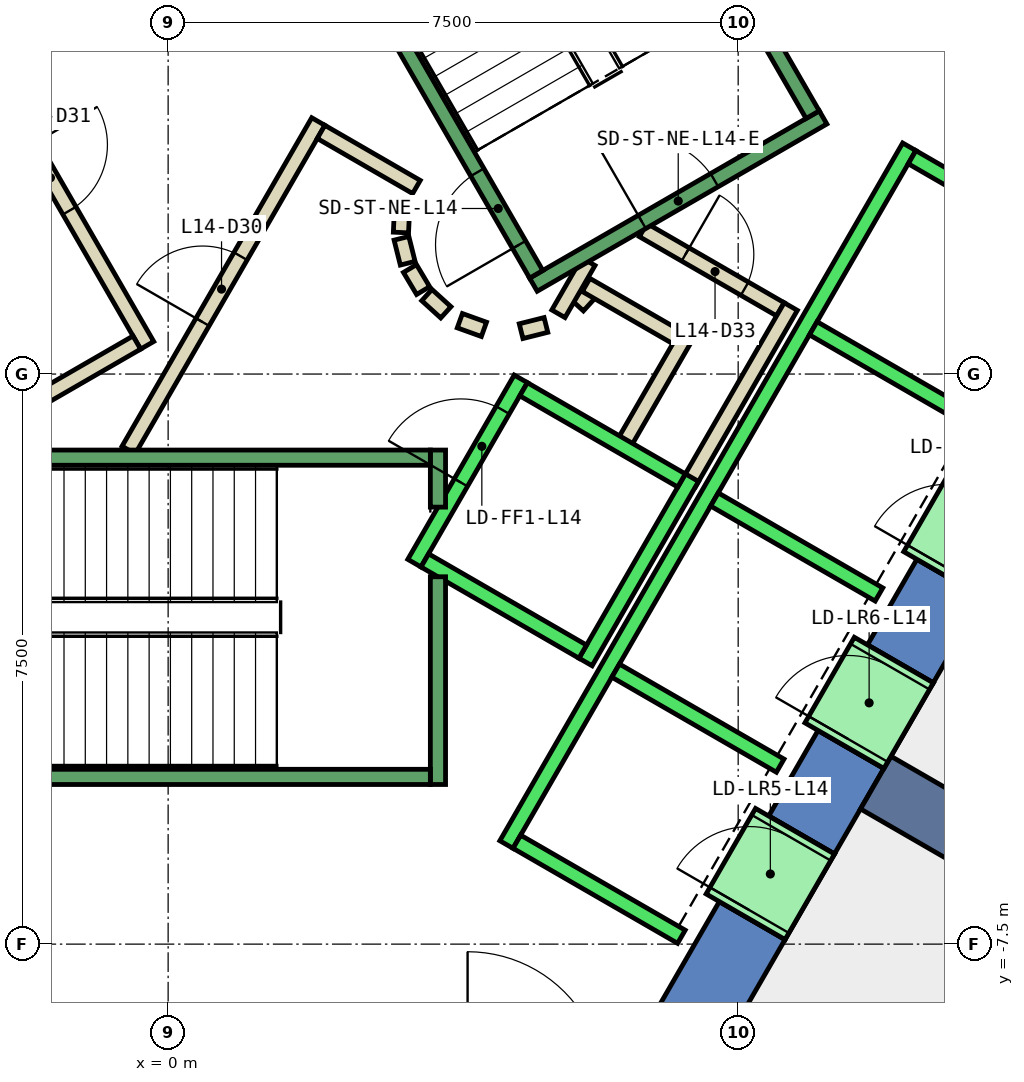
"""IFC4 building model, lengths in metres.
Left out: names, types, materials, properties, quantities, classifications, styles, units other than length and angle.
Written with IfcOpenShell. Run it as: python <this file> out.ifc"""

import sys

from ifc_helpers import new_model, si_unit, direction, frame, frame_2d, origin, place, context, subcontext, project, spatial, polyline, rectangle, outline, extrude, element, fill, save


model = new_model("IFC4")
c1 = context("Model", 3, precision=1e-05, world=origin(), true_north=direction((0.0, 1.0)))
c2 = subcontext(c1, "Body", "Model", "MODEL_VIEW")
j1 = project(units=[si_unit("LENGTHUNIT", "METRE"), si_unit("PLANEANGLEUNIT", "RADIAN")], contexts=[c1])
p1 = place(None, origin())
s1 = spatial("IfcSite", under=j1, at=p1, CompositionType="ELEMENT")
p2 = place(p1, origin())
s2 = spatial("IfcBuilding", under=s1, at=p2, CompositionType="ELEMENT")
p3 = place(p2, frame((0.0, 0.0, 68.6)))
s3 = spatial("IfcBuildingStorey", under=s2, at=p3, CompositionType="ELEMENT", Elevation=68.6)
p4 = place(p3, frame((0.0, 0.0, -0.4)))
e1 = element("IfcWall", 1, at=p4, inside=s3, PredefinedType="SHEAR", context=c2, shape_type="SweptSolid", body=[
    extrude(outline(polyline([(8.517, 11.748), (7.651, 11.248), (12.702, 2.5), (13.856, 2.5), (8.517, 11.748)])), origin(), (0.0, 0.0, 1.0), 4.2),
])
p5 = place(p3, frame((0.0, 0.0, -0.4)))
e2 = element("IfcWall", 2, at=p5, inside=s3, PredefinedType="SHEAR", context=c2, shape_type="SweptSolid", body=[
    extrude(outline(polyline([(8.117, -7.44), (7.252, -6.94), (6.351, -8.5), (6.928, -9.5), (8.117, -7.44)])), origin(), (0.0, 0.0, 1.0), 4.2),
])
p6 = place(p3, frame((0.0, 0.0, -0.4)))
e3 = element("IfcWall", 3, at=p6, inside=s3, PredefinedType="SHEAR", context=c2, shape_type="SweptSolid", body=[
    extrude(outline(polyline([(9.417, -5.189), (8.551, -4.689), (7.902, -5.814), (8.767, -6.314), (9.417, -5.189)])), origin(), (0.0, 0.0, 1.0), 4.2),
])
p7 = place(p3, frame((0.0, 0.0, -0.4)))
e4 = element("IfcWall", 4, at=p7, inside=s3, PredefinedType="SHEAR", context=c2, shape_type="SweptSolid", body=[
    extrude(outline(polyline([(10.717, -2.937), (9.851, -2.437), (9.201, -3.563), (10.067, -4.063), (10.717, -2.937)])), origin(), (0.0, 0.0, 1.0), 4.2),
])
p8 = place(p3, frame((0.0, 0.0, 3.6)))
e5 = element("IfcWall", 5, at=p8, inside=s3, PredefinedType="SHEAR", context=c2, shape_type="SweptSolid", body=[
    extrude(outline(polyline([(8.767, -6.314), (7.902, -5.814), (7.252, -6.94), (8.117, -7.44), (8.767, -6.314)])), origin(), (0.0, 0.0, 1.0), 0.2),
])
p9 = place(p3, frame((0.0, 0.0, 3.6)))
e6 = element("IfcWall", 6, at=p9, inside=s3, PredefinedType="SHEAR", context=c2, shape_type="SweptSolid", body=[
    extrude(outline(polyline([(10.067, -4.063), (9.201, -3.563), (8.551, -4.689), (9.417, -5.189), (10.067, -4.063)])), origin(), (0.0, 0.0, 1.0), 0.2),
])
p10 = place(p3, frame((0.0, 0.0, 3.6)))
e7 = element("IfcWall", 7, at=p10, inside=s3, PredefinedType="SHEAR", context=c2, shape_type="SweptSolid", body=[
    extrude(outline(polyline([(11.367, -1.811), (10.501, -1.311), (9.851, -2.437), (10.717, -2.937), (11.367, -1.811)])), origin(), (0.0, 0.0, 1.0), 0.2),
])
p11 = place(p3, frame((9.31, -5.375, -0.4), z_axis=(0.0, 0.0, 1.0), x_axis=(0.866017533419, -0.500013631625, 0.0)))
e8 = element("IfcWall", 8, at=p11, inside=s3, PredefinedType="SHEAR", context=c2, shape_type="SweptSolid", body=[
    extrude(rectangle(XDim=9.0, YDim=0.8, at=frame_2d((4.5, 0.0))), origin(), (0.0, 0.0, 1.0), 4.2),
])
p12 = place(p3, frame((5.39, 0.898, 0.0), z_axis=(0.0, 0.0, 1.0), x_axis=(0.673828488714, 0.738887791073, 0.0)))
e9 = element("IfcWall", 9, at=p12, inside=s3, PredefinedType="PARTITIONING", context=c2, shape_type="SweptSolid", body=[
    extrude(rectangle(XDim=0.263, YDim=0.2, at=frame_2d((0.131, 0.0))), origin(), (0.0, 0.0, 1.0), 3.8),
])
p13 = place(p3, frame((5.499, 1.172, 0.0), z_axis=(0.0, 0.0, 1.0), x_axis=(0.866333505267, -0.499465972466, 0.0)))
e10 = element("IfcWall", 10, at=p13, inside=s3, PredefinedType="PARTITIONING", context=c2, shape_type="SweptSolid", body=[
    extrude(rectangle(XDim=1.374, YDim=0.2, at=frame_2d((0.687, 0.0))), origin(), (0.0, 0.0, 1.0), 3.8),
])
p14 = place(p3, frame((6.826, 0.522, 0.0), z_axis=(0.0, 0.0, 1.0), x_axis=(-0.500016722714, -0.866015748706, 0.0)))
e11 = element("IfcWall", 11, at=p14, inside=s3, PredefinedType="PARTITIONING", context=c2, shape_type="SweptSolid", body=[
    extrude(rectangle(XDim=1.7, YDim=0.2, at=frame_2d((0.85, 0.0))), origin(), (0.0, 0.0, 1.0), 3.8),
])
p15 = place(p3, frame((6.25, 1.894, 0.0), z_axis=(0.0, 0.0, 1.0), x_axis=(0.866043184279, -0.499969202016, 0.0)))
e12 = element("IfcWall", 12, at=p15, inside=s3, PredefinedType="PARTITIONING", context=c2, shape_type="SweptSolid", body=[
    extrude(rectangle(XDim=2.084, YDim=0.2, at=frame_2d((1.042, 0.0))), origin(), (0.0, 0.0, 1.0), 3.8),
])
p16 = place(p15, frame((0.642, 0.0, 0.0)))
e13 = element("IfcOpeningElement", 13, at=p16, cuts=e12, PredefinedType="OPENING", context=c2, shape_type="SweptSolid", body=[
    extrude(rectangle(XDim=0.9, YDim=2.1, at=frame_2d((0.45, 1.05))), frame((0.0, 0.11, 0.0), z_axis=(0.0, -1.0, 0.0), x_axis=(1.0, 0.0, 0.0)), (0.0, 0.0, 1.0), 0.22),
])
p17 = place(p3, frame((8.192, 0.888, 0.0), z_axis=(0.0, 0.0, 1.0), x_axis=(-0.499940625693, -0.866059680843, 0.0)))
e14 = element("IfcWall", 14, at=p17, inside=s3, PredefinedType="PARTITIONING", context=c2, shape_type="SweptSolid", body=[
    extrude(rectangle(XDim=2.68, YDim=0.2, at=frame_2d((1.34, 0.0))), origin(), (0.0, 0.0, 1.0), 3.8),
])
p18 = place(p3, frame((5.135, 0.793, 0.0), z_axis=(0.0, 0.0, 1.0), x_axis=(0.499526442893, 0.866298639529, 0.0)))
e15 = element("IfcWall", 15, at=p18, inside=s3, PredefinedType="PARTITIONING", context=c2, shape_type="SweptSolid", body=[
    extrude(rectangle(XDim=0.791, YDim=0.2, at=frame_2d((0.396, 0.0))), origin(), (0.0, 0.0, 1.0), 3.8),
])
p19 = place(p3, frame((-0.52, -1.0, 0.0), z_axis=(0.0, 0.0, 1.0), x_axis=(0.50011622646, 0.865958290007, 0.0)))
e16 = element("IfcWall", 16, at=p19, inside=s3, PredefinedType="PARTITIONING", context=c2, shape_type="SweptSolid", body=[
    extrude(rectangle(XDim=4.991, YDim=0.2, at=frame_2d((2.496, 0.0))), origin(), (0.0, 0.0, 1.0), 3.8),
])
p20 = place(p19, frame((1.945, 0.0, 0.0)))
e17 = element("IfcOpeningElement", 17, at=p20, cuts=e16, PredefinedType="OPENING", context=c2, shape_type="SweptSolid", body=[
    extrude(rectangle(XDim=1.0, YDim=2.1, at=frame_2d((0.5, 1.05))), frame((0.0, 0.11, 0.0), z_axis=(0.0, -1.0, 0.0), x_axis=(1.0, 0.0, 0.0)), (0.0, 0.0, 1.0), 0.22),
])
p21 = place(p3, frame((2.012, 3.186, 0.0), z_axis=(0.0, 0.0, 1.0), x_axis=(0.865891012941, -0.500232699559, 0.0)))
e18 = element("IfcWall", 18, at=p21, inside=s3, PredefinedType="PARTITIONING", context=c2, shape_type="SweptSolid", body=[
    extrude(rectangle(XDim=1.449, YDim=0.2, at=frame_2d((0.725, 0.0))), origin(), (0.0, 0.0, 1.0), 3.8),
])
p22 = place(p3, frame((3.079, 2.199, 0.0), z_axis=(0.0, 0.0, 1.0), x_axis=(-0.047771483479, -0.998858290933, 0.0)))
e19 = element("IfcWall", 19, at=p22, inside=s3, PredefinedType="PARTITIONING", context=c2, shape_type="SweptSolid", body=[
    extrude(rectangle(XDim=0.337, YDim=0.2, at=frame_2d((0.169, 0.0))), origin(), (0.0, 0.0, 1.0), 3.8),
])
p23 = place(p3, frame((3.07, 1.786, 0.0), z_axis=(0.0, 0.0, 1.0), x_axis=(0.242705583207, -0.970099994784, 0.0)))
e20 = element("IfcWall", 20, at=p23, inside=s3, PredefinedType="PARTITIONING", context=c2, shape_type="SweptSolid", body=[
    extrude(rectangle(XDim=0.338, YDim=0.2, at=frame_2d((0.169, 0.0))), origin(), (0.0, 0.0, 1.0), 3.8),
])
for number, where, z_axis, x_axis in (
    (21, (3.182, 1.388, 0.0), (0.0, 0.0, 1.0), (0.512, -0.859, 0.0)),
    (22, (3.404, 1.039, 0.0), (0.0, 0.0, 1.0), (0.74, -0.672, 0.0)),
):
    element("IfcWall", number, at=place(p3, frame(where, z_axis=z_axis, x_axis=x_axis)), inside=s3, PredefinedType="PARTITIONING", context=c2, shape_type="SweptSolid", body=[
        extrude(rectangle(XDim=0.338, YDim=0.2, at=frame_2d((0.169, 0.0))), origin(), (0.0, 0.0, 1.0), 3.8),
    ])
p24 = place(p3, frame((3.838, 0.702, 0.0), z_axis=(0.0, 0.0, 1.0), x_axis=(0.941035081519, -0.338308993895, 0.0)))
e23 = element("IfcWall", 23, at=p24, inside=s3, PredefinedType="PARTITIONING", context=c2, shape_type="SweptSolid", body=[
    extrude(rectangle(XDim=0.337, YDim=0.2, at=frame_2d((0.168, 0.0))), origin(), (0.0, 0.0, 1.0), 3.8),
])
p25 = place(p3, frame((4.644, 0.564, 0.0), z_axis=(0.0, 0.0, 1.0), x_axis=(0.969929076366, 0.243387729394, 0.0)))
e24 = element("IfcWall", 24, at=p25, inside=s3, PredefinedType="PARTITIONING", context=c2, shape_type="SweptSolid", body=[
    extrude(rectangle(XDim=0.337, YDim=0.2, at=frame_2d((0.168, 0.0))), origin(), (0.0, 0.0, 1.0), 3.8),
])
p26 = place(p3, frame((-2.771, 4.7, 0.0), z_axis=(0.0, 0.0, 1.0), x_axis=(0.499969479948, -0.866043023828, 0.0)))
e25 = element("IfcWall", 25, at=p26, inside=s3, PredefinedType="PARTITIONING", context=c2, shape_type="SweptSolid", body=[
    extrude(rectangle(XDim=4.99, YDim=0.2, at=frame_2d((2.495, 0.0))), origin(), (0.0, 0.0, 1.0), 3.8),
])
p27 = place(p26, frame((1.945, 0.0, 0.0)))
e26 = element("IfcOpeningElement", 26, at=p27, cuts=e25, PredefinedType="OPENING", context=c2, shape_type="SweptSolid", body=[
    extrude(rectangle(XDim=1.0, YDim=2.1, at=frame_2d((0.5, 1.05))), frame((0.0, 0.11, 0.0), z_axis=(0.0, -1.0, 0.0), x_axis=(1.0, 0.0, 0.0)), (0.0, 0.0, 1.0), 0.22),
])
p28 = place(p3, frame((-0.412, 0.414, 0.0), z_axis=(0.0, 0.0, 1.0), x_axis=(-0.866017369001, -0.500013916395, 0.0)))
e27 = element("IfcWall", 27, at=p28, inside=s3, PredefinedType="PARTITIONING", context=c2, shape_type="SweptSolid", body=[
    extrude(rectangle(XDim=1.45, YDim=0.2, at=frame_2d((0.725, 0.0))), origin(), (0.0, 0.0, 1.0), 3.8),
])
p29 = place(p3, frame((12.401, -7.622, 0.0), z_axis=(0.0, 0.0, 1.0), x_axis=(-0.500029185841, -0.866008552675, 0.0)))
e28 = element("IfcWall", 28, at=p29, inside=s3, PredefinedType="PARTITIONING", context=c2, shape_type="SweptSolid", body=[
    extrude(rectangle(XDim=9.301, YDim=0.2, at=frame_2d((4.651, 0.0))), origin(), (0.0, 0.0, 1.0), 3.8),
])
p30 = place(p3, frame((3.24, -2.488, 0.0), z_axis=(0.0, 0.0, 1.0), x_axis=(0.49994636267, 0.866056369097, 0.0)))
e29 = element("IfcWall", 29, at=p30, inside=s3, PredefinedType="STANDARD", context=c2, shape_type="SweptSolid", body=[
    extrude(rectangle(XDim=2.8, YDim=0.2, at=frame_2d((1.4, 0.0))), origin(), (0.0, 0.0, 1.0), 3.8),
])
p31 = place(p30, frame((1.225, 0.0, 0.0)))
e30 = element("IfcOpeningElement", 30, at=p31, cuts=e29, PredefinedType="OPENING", context=c2, shape_type="SweptSolid", body=[
    extrude(rectangle(XDim=1.1, YDim=2.1, at=frame_2d((0.55, 1.05))), frame((0.0, 0.11, 0.0), z_axis=(0.0, -1.0, 0.0), x_axis=(1.0, 0.0, 0.0)), (0.0, 0.0, 1.0), 0.22),
])
p32 = place(p3, frame((5.492, -3.788, 0.0), z_axis=(0.0, 0.0, 1.0), x_axis=(0.500011755427, 0.866018616679, 0.0)))
e31 = element("IfcWall", 31, at=p32, inside=s3, PredefinedType="STANDARD", context=c2, shape_type="SweptSolid", body=[
    extrude(rectangle(XDim=2.8, YDim=0.2, at=frame_2d((1.4, 0.0))), origin(), (0.0, 0.0, 1.0), 3.8),
])
p33 = place(p3, frame((3.377, -2.452, 0.0), z_axis=(0.0, 0.0, 1.0), x_axis=(0.865955154139, -0.50012165622, 0.0)))
e32 = element("IfcWall", 32, at=p33, inside=s3, PredefinedType="STANDARD", context=c2, shape_type="SweptSolid", body=[
    extrude(rectangle(XDim=2.4, YDim=0.2, at=frame_2d((1.2, 0.0))), origin(), (0.0, 0.0, 1.0), 3.8),
])
p34 = place(p3, frame((4.677, -0.2, 0.0), z_axis=(0.0, 0.0, 1.0), x_axis=(0.865973769406, -0.500089422704, 0.0)))
e33 = element("IfcWall", 33, at=p34, inside=s3, PredefinedType="STANDARD", context=c2, shape_type="SweptSolid", body=[
    extrude(rectangle(XDim=2.399, YDim=0.2, at=frame_2d((1.2, 0.0))), origin(), (0.0, 0.0, 1.0), 3.8),
])
p35 = place(p3, frame((4.451, -6.19, 0.0), z_axis=(0.0, 0.0, 1.0), x_axis=(0.50000090737, 0.866024879913, 0.0)))
e34 = element("IfcWall", 34, at=p35, inside=s3, PredefinedType="STANDARD", context=c2, shape_type="SweptSolid", body=[
    extrude(rectangle(XDim=10.6, YDim=0.2, at=frame_2d((5.3, 0.0))), origin(), (0.0, 0.0, 1.0), 3.8),
])
for number, where, z_axis, x_axis in (
    (35, (4.588, -6.153, 0.0), (0.0, 0.0, 1.0), (0.866, -0.5, 0.0)),
    (36, (5.888, -3.902, 0.0), (0.0, 0.0, 1.0), (0.866, -0.5, 0.0)),
    (37, (7.188, -1.65, 0.0), (0.0, 0.0, 1.0), (0.866, -0.5, 0.0)),
    (38, (8.488, 0.602, 0.0), (0.0, 0.0, 1.0), (0.866, -0.5, 0.0)),
):
    element("IfcWall", number, at=place(p3, frame(where, z_axis=z_axis, x_axis=x_axis)), inside=s3, PredefinedType="STANDARD", context=c2, shape_type="SweptSolid", body=[
        extrude(rectangle(XDim=2.5, YDim=0.2, at=frame_2d((1.25, 0.0))), origin(), (0.0, 0.0, 1.0), 3.8),
    ])
p36 = place(p3, frame((9.788, 2.853, 0.0), z_axis=(0.0, 0.0, 1.0), x_axis=(0.865998541277, -0.500046524342, 0.0)))
e39 = element("IfcWall", 39, at=p36, inside=s3, PredefinedType="STANDARD", context=c2, shape_type="SweptSolid", body=[
    extrude(rectangle(XDim=2.5, YDim=0.2, at=frame_2d((1.25, 0.0))), origin(), (0.0, 0.0, 1.0), 3.8),
])
p37 = place(p3, frame((7.598, -7.14, 0.0), z_axis=(0.0, 0.0, 1.0), x_axis=(0.500362116554, 0.865816234728, 0.0)))
e40 = element("IfcWall", 40, at=p37, inside=s3, PredefinedType="STANDARD", context=c2, shape_type="SweptSolid", body=[
    extrude(rectangle(XDim=1.299, YDim=1.2, at=frame_2d((0.65, 0.0))), origin(), (0.0, 0.0, 1.0), 2.4),
])
p38 = place(p37, frame((0.1, 0.0, 0.0)))
e41 = element("IfcOpeningElement", 41, at=p38, cuts=e40, PredefinedType="OPENING", context=c2, shape_type="SweptSolid", body=[
    extrude(rectangle(XDim=1.1, YDim=2.3, at=frame_2d((0.55, 1.15))), frame((0.0, 0.61, 0.0), z_axis=(0.0, -1.0, 0.0), x_axis=(1.0, 0.0, 0.0)), (0.0, 0.0, 1.0), 1.22),
])
p39 = place(p3, frame((8.898, -4.889, 0.0), z_axis=(0.0, 0.0, 1.0), x_axis=(0.500036693733, 0.866004217611, 0.0)))
e42 = element("IfcWall", 42, at=p39, inside=s3, PredefinedType="STANDARD", context=c2, shape_type="SweptSolid", body=[
    extrude(rectangle(XDim=1.3, YDim=1.2, at=frame_2d((0.65, 0.0))), origin(), (0.0, 0.0, 1.0), 2.4),
])
p40 = place(p39, frame((0.1, 0.0, 0.0)))
e43 = element("IfcOpeningElement", 43, at=p40, cuts=e42, PredefinedType="OPENING", context=c2, shape_type="SweptSolid", body=[
    extrude(rectangle(XDim=1.1, YDim=2.3, at=frame_2d((0.55, 1.15))), frame((0.0, 0.61, 0.0), z_axis=(0.0, -1.0, 0.0), x_axis=(1.0, 0.0, 0.0)), (0.0, 0.0, 1.0), 1.22),
])
p41 = place(p3, frame((10.198, -2.637, 0.0), z_axis=(0.0, 0.0, 1.0), x_axis=(0.49989585183, 0.866085525409, 0.0)))
e44 = element("IfcWall", 44, at=p41, inside=s3, PredefinedType="STANDARD", context=c2, shape_type="SweptSolid", body=[
    extrude(rectangle(XDim=1.3, YDim=1.2, at=frame_2d((0.65, 0.0))), origin(), (0.0, 0.0, 1.0), 2.4),
])
p42 = place(p41, frame((0.1, 0.0, 0.0)))
e45 = element("IfcOpeningElement", 45, at=p42, cuts=e44, PredefinedType="OPENING", context=c2, shape_type="SweptSolid", body=[
    extrude(rectangle(XDim=1.1, YDim=2.3, at=frame_2d((0.55, 1.15))), frame((0.0, 0.61, 0.0), z_axis=(0.0, -1.0, 0.0), x_axis=(1.0, 0.0, 0.0)), (0.0, 0.0, 1.0), 1.22),
])
p43 = place(p3, frame((3.55, -2.667, 0.0), z_axis=(0.0, 0.0, 1.0), x_axis=(0.0, -1.0, 0.0)))
e46 = element("IfcWall", 46, at=p43, inside=s3, PredefinedType="STANDARD", context=c2, shape_type="SweptSolid", body=[
    extrude(rectangle(XDim=2.733, YDim=0.2, at=frame_2d((1.366, 0.0))), origin(), (0.0, 0.0, 1.0), 3.8),
])
p44 = place(p3, frame((3.55, -1.0, 0.0), z_axis=(0.0, 0.0, 1.0), x_axis=(0.0, -1.0, 0.0)))
e47 = element("IfcWall", 47, at=p44, inside=s3, PredefinedType="STANDARD", context=c2, shape_type="SweptSolid", body=[
    extrude(rectangle(XDim=0.751, YDim=0.2, at=frame_2d((0.375, 0.0))), origin(), (0.0, 0.0, 1.0), 3.8),
])
p45 = place(p3, frame((-3.45, -1.1, 0.0), z_axis=(0.0, 0.0, 1.0), x_axis=(1.0, 0.0, 0.0)))
e48 = element("IfcWall", 48, at=p45, inside=s3, PredefinedType="STANDARD", context=c2, shape_type="SweptSolid", body=[
    extrude(rectangle(XDim=6.9, YDim=0.2, at=frame_2d((3.45, 0.0))), origin(), (0.0, 0.0, 1.0), 3.8),
])
p46 = place(p45, frame((0.45, 0.0, 0.0)))
e49 = element("IfcOpeningElement", 49, at=p46, cuts=e48, PredefinedType="OPENING", context=c2, shape_type="SweptSolid", body=[
    extrude(rectangle(XDim=1.1, YDim=2.2, at=frame_2d((0.55, 1.1))), frame((0.0, 0.11, 0.0), z_axis=(0.0, -1.0, 0.0), x_axis=(1.0, 0.0, 0.0)), (0.0, 0.0, 1.0), 0.22),
])
p47 = place(p3, frame((-3.45, -5.3, 0.0), z_axis=(0.0, 0.0, 1.0), x_axis=(1.0, 0.0, 0.0)))
e50 = element("IfcWall", 50, at=p47, inside=s3, PredefinedType="STANDARD", context=c2, shape_type="SweptSolid", body=[
    extrude(rectangle(XDim=6.9, YDim=0.2, at=frame_2d((3.45, 0.0))), origin(), (0.0, 0.0, 1.0), 3.8),
])
p48 = place(p3, frame((4.806, 1.176, 0.0), z_axis=(0.0, 0.0, 1.0), x_axis=(0.866059941101, 0.499940174841, 0.0)))
e51 = element("IfcWall", 51, at=p48, inside=s3, PredefinedType="STANDARD", context=c2, shape_type="SweptSolid", body=[
    extrude(rectangle(XDim=4.4, YDim=0.2, at=frame_2d((2.2, 0.0))), origin(), (0.0, 0.0, 1.0), 3.8),
])
p49 = place(p48, frame((1.65, 0.0, 0.0)))
e52 = element("IfcOpeningElement", 52, at=p49, cuts=e51, PredefinedType="OPENING", context=c2, shape_type="SweptSolid", body=[
    extrude(rectangle(XDim=1.1, YDim=2.2, at=frame_2d((0.55, 1.1))), frame((0.0, 0.11, 0.0), z_axis=(0.0, -1.0, 0.0), x_axis=(1.0, 0.0, 0.0)), (0.0, 0.0, 1.0), 0.22),
])
p50 = place(p3, frame((4.843, 1.312, 0.0), z_axis=(0.0, 0.0, 1.0), x_axis=(-0.499963383562, 0.866046543262, 0.0)))
e53 = element("IfcWall", 53, at=p50, inside=s3, PredefinedType="STANDARD", context=c2, shape_type="SweptSolid", body=[
    extrude(rectangle(XDim=6.9, YDim=0.2, at=frame_2d((3.45, 0.0))), origin(), (0.0, 0.0, 1.0), 3.8),
])
p51 = place(p50, frame((0.45, 0.0, 0.0)))
e54 = element("IfcOpeningElement", 54, at=p51, cuts=e53, PredefinedType="OPENING", context=c2, shape_type="SweptSolid", body=[
    extrude(rectangle(XDim=1.1, YDim=2.2, at=frame_2d((0.55, 1.1))), frame((0.0, 0.11, 0.0), z_axis=(0.0, -1.0, 0.0), x_axis=(1.0, 0.0, 0.0)), (0.0, 0.0, 1.0), 0.22),
])
p52 = place(p3, frame((8.48, 3.412, 0.0), z_axis=(0.0, 0.0, 1.0), x_axis=(-0.499978703459, 0.866037698999, 0.0)))
e55 = element("IfcWall", 55, at=p52, inside=s3, PredefinedType="STANDARD", context=c2, shape_type="SweptSolid", body=[
    extrude(rectangle(XDim=6.9, YDim=0.2, at=frame_2d((3.45, 0.0))), origin(), (0.0, 0.0, 1.0), 3.8),
])
p53 = place(p3, frame((-1.393, 7.288, 0.0), z_axis=(0.0, 0.0, 1.0), x_axis=(-0.499963383562, -0.866046543262, 0.0)))
e56 = element("IfcWall", 56, at=p53, inside=s3, PredefinedType="STANDARD", context=c2, shape_type="SweptSolid", body=[
    extrude(rectangle(XDim=6.9, YDim=0.2, at=frame_2d((3.45, 0.0))), origin(), (0.0, 0.0, 1.0), 3.8),
])
p54 = place(p53, frame((0.45, 0.0, 0.0)))
e57 = element("IfcOpeningElement", 57, at=p54, cuts=e56, PredefinedType="OPENING", context=c2, shape_type="SweptSolid", body=[
    extrude(rectangle(XDim=1.1, YDim=2.2, at=frame_2d((0.55, 1.1))), frame((0.0, 0.11, 0.0), z_axis=(0.0, -1.0, 0.0), x_axis=(1.0, 0.0, 0.0)), (0.0, 0.0, 1.0), 0.22),
])
p55 = place(p20, origin())
e58 = element("IfcDoor", 58, at=p55, inside=s3, OperationType="SINGLE_SWING_LEFT", PredefinedType="DOOR", context=c2, shape_type="SweptSolid", body=[
    extrude(rectangle(XDim=1.0, YDim=2.1, at=frame_2d((0.5, 1.05))), frame((0.0, 0.025, 0.0), z_axis=(0.0, -1.0, 0.0), x_axis=(1.0, 0.0, 0.0)), (0.0, 0.0, 1.0), 0.05),
])
fill(e17, e58)
p56 = place(p27, origin())
e59 = element("IfcDoor", 59, at=p56, inside=s3, OperationType="SINGLE_SWING_RIGHT", PredefinedType="DOOR", context=c2, shape_type="SweptSolid", body=[
    extrude(rectangle(XDim=1.0, YDim=2.1, at=frame_2d((0.5, 1.05))), frame((0.0, 0.025, 0.0), z_axis=(0.0, -1.0, 0.0), x_axis=(1.0, 0.0, 0.0)), (0.0, 0.0, 1.0), 0.05),
])
fill(e26, e59)
p57 = place(p16, origin())
e60 = element("IfcDoor", 60, at=p57, inside=s3, OperationType="SINGLE_SWING_LEFT", PredefinedType="DOOR", context=c2, shape_type="SweptSolid", body=[
    extrude(rectangle(XDim=0.9, YDim=2.1, at=frame_2d((0.45, 1.05))), frame((0.0, 0.025, 0.0), z_axis=(0.0, -1.0, 0.0), x_axis=(1.0, 0.0, 0.0)), (0.0, 0.0, 1.0), 0.05),
])
fill(e13, e60)
p58 = place(p38, origin())
e61 = element("IfcDoor", 61, at=p58, inside=s3, OperationType="SLIDING_TO_LEFT", PredefinedType="DOOR", context=c2, shape_type="SweptSolid", body=[
    extrude(rectangle(XDim=1.1, YDim=2.3, at=frame_2d((0.55, 1.15))), frame((0.0, 0.025, 0.0), z_axis=(0.0, -1.0, 0.0), x_axis=(1.0, 0.0, 0.0)), (0.0, 0.0, 1.0), 0.05),
])
fill(e41, e61)
p59 = place(p40, origin())
e62 = element("IfcDoor", 62, at=p59, inside=s3, OperationType="SLIDING_TO_LEFT", PredefinedType="DOOR", context=c2, shape_type="SweptSolid", body=[
    extrude(rectangle(XDim=1.1, YDim=2.3, at=frame_2d((0.55, 1.15))), frame((0.0, 0.025, 0.0), z_axis=(0.0, -1.0, 0.0), x_axis=(1.0, 0.0, 0.0)), (0.0, 0.0, 1.0), 0.05),
])
fill(e43, e62)
p60 = place(p31, origin())
e63 = element("IfcDoor", 63, at=p60, inside=s3, OperationType="SLIDING_TO_LEFT", PredefinedType="DOOR", context=c2, shape_type="SweptSolid", body=[
    extrude(rectangle(XDim=1.1, YDim=2.1, at=frame_2d((0.55, 1.05))), frame((0.0, 0.025, 0.0), z_axis=(0.0, -1.0, 0.0), x_axis=(1.0, 0.0, 0.0)), (0.0, 0.0, 1.0), 0.05),
])
fill(e30, e63)
p61 = place(p51, origin())
e64 = element("IfcDoor", 64, at=p61, inside=s3, OperationType="SINGLE_SWING_LEFT", PredefinedType="DOOR", context=c2, shape_type="SweptSolid", body=[
    extrude(rectangle(XDim=1.1, YDim=2.2, at=frame_2d((0.55, 1.1))), frame((0.0, 0.025, 0.0), z_axis=(0.0, -1.0, 0.0), x_axis=(1.0, 0.0, 0.0)), (0.0, 0.0, 1.0), 0.05),
])
fill(e54, e64)
p62 = place(p49, origin())
e65 = element("IfcDoor", 65, at=p62, inside=s3, OperationType="SINGLE_SWING_LEFT", PredefinedType="DOOR", context=c2, shape_type="SweptSolid", body=[
    extrude(rectangle(XDim=1.1, YDim=2.2, at=frame_2d((0.55, 1.1))), frame((0.0, 0.025, 0.0), z_axis=(0.0, -1.0, 0.0), x_axis=(1.0, 0.0, 0.0)), (0.0, 0.0, 1.0), 0.05),
])
fill(e52, e65)
save(model, sys.argv[1])
